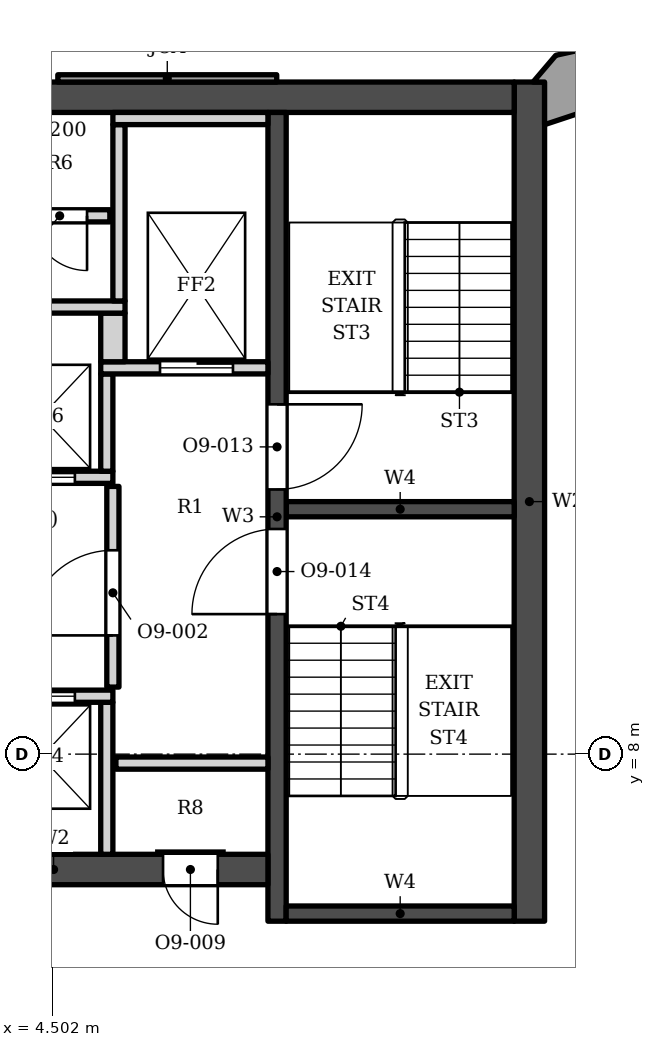
"""IFC4 building model, lengths in metres.
Left out: names, types, materials, properties, quantities, classifications, styles, units other than length and angle.
Written with IfcOpenShell. Run it as: python <this file> out.ifc"""

import sys

from ifc_helpers import new_model, si_unit, direction, frame, frame_2d, origin, place, context, subcontext, project, spatial, polyline, rectangle, outline, extrude, element, fill, save


model = new_model("IFC4")
c1 = context("Model", 3, precision=1e-05, world=origin(), true_north=direction((0.0, 1.0)))
c2 = subcontext(c1, "Body", "Model", "MODEL_VIEW")
j1 = project(units=[si_unit("LENGTHUNIT", "METRE"), si_unit("PLANEANGLEUNIT", "RADIAN")], contexts=[c1])
p1 = place(None, origin())
s1 = spatial("IfcSite", under=j1, at=p1, CompositionType="ELEMENT")
p2 = place(p1, origin())
s2 = spatial("IfcBuilding", under=s1, at=p2, CompositionType="ELEMENT")
p3 = place(p2, frame((0.0, 0.0, 248.2)))
s3 = spatial("IfcBuildingStorey", under=s2, at=p3, CompositionType="ELEMENT", Elevation=248.2)
p4 = place(p3, frame((-12.1, 18.802, 0.0), z_axis=(0.0, 0.0, 1.0), x_axis=(1.0, 0.0, 0.0)))
e1 = element("IfcWall", 1, at=p4, inside=s3, PredefinedType="SHEAR", context=c2, shape_type="SweptSolid", body=[
    extrude(rectangle(XDim=24.2, YDim=0.5, at=frame_2d((12.1, 0.0))), origin(), (0.0, 0.0, 1.0), 3.9),
])
p5 = place(p3, frame((12.35, 5.253, 0.0), z_axis=(0.0, 0.0, 1.0), x_axis=(0.0, 1.0, 0.0)))
e2 = element("IfcWall", 2, at=p5, inside=s3, PredefinedType="SHEAR", context=c2, shape_type="SweptSolid", body=[
    extrude(rectangle(XDim=13.8, YDim=0.5, at=frame_2d((6.9, 0.0))), origin(), (0.0, 0.0, 1.0), 3.9),
])
p6 = place(p3, frame((8.2, 5.253, 0.0), z_axis=(0.0, 0.0, 1.0), x_axis=(0.0, 1.0, 0.0)))
e3 = element("IfcWall", 3, at=p6, inside=s3, PredefinedType="SHEAR", context=c2, shape_type="SweptSolid", body=[
    extrude(rectangle(XDim=13.3, YDim=0.3, at=frame_2d((6.65, 0.0))), origin(), (0.0, 0.0, 1.0), 3.9),
])
p7 = place(p6, frame((7.1, 0.0, 0.0)))
e4 = element("IfcOpeningElement", 4, at=p7, cuts=e3, PredefinedType="OPENING", context=c2, shape_type="SweptSolid", body=[
    extrude(rectangle(XDim=1.4, YDim=2.1, at=frame_2d((0.7, 1.05))), frame((0.0, 0.16, 0.0), z_axis=(0.0, -1.0, 0.0), x_axis=(1.0, 0.0, 0.0)), (0.0, 0.0, 1.0), 0.32),
])
p8 = place(p6, frame((5.05, 0.0, 0.0)))
e5 = element("IfcOpeningElement", 5, at=p8, cuts=e3, PredefinedType="OPENING", context=c2, shape_type="SweptSolid", body=[
    extrude(rectangle(XDim=1.4, YDim=2.1, at=frame_2d((0.7, 1.05))), frame((0.0, 0.16, 0.0), z_axis=(0.0, -1.0, 0.0), x_axis=(1.0, 0.0, 0.0)), (0.0, 0.0, 1.0), 0.32),
])
for number, where, z_axis, x_axis in (
    (6, (8.35, 12.028, 0.0), (0.0, 0.0, 1.0), (1.0, 0.0, 0.0)),
    (7, (8.35, 5.378, 0.0), (0.0, 0.0, 1.0), (1.0, 0.0, 0.0)),
):
    element("IfcWall", number, at=place(p3, frame(where, z_axis=z_axis, x_axis=x_axis)), inside=s3, PredefinedType="SHEAR", context=c2, shape_type="SweptSolid", body=[
        extrude(rectangle(XDim=3.75, YDim=0.25, at=frame_2d((1.875, 0.0))), origin(), (0.0, 0.0, 1.0), 3.9),
    ])
p9 = place(p3, frame((1.0, 6.103, 0.0), z_axis=(0.0, 0.0, 1.0), x_axis=(1.0, 0.0, 0.0)))
e8 = element("IfcWall", 8, at=p9, inside=s3, PredefinedType="SHEAR", context=c2, shape_type="SweptSolid", body=[
    extrude(rectangle(XDim=7.05, YDim=0.5, at=frame_2d((3.525, 0.0))), origin(), (0.0, 0.0, 1.0), 3.9),
])
p10 = place(p9, frame((5.325, 0.0, 0.0)))
e9 = element("IfcOpeningElement", 9, at=p10, cuts=e8, PredefinedType="OPENING", context=c2, shape_type="SweptSolid", body=[
    extrude(rectangle(XDim=0.9, YDim=2.1, at=frame_2d((0.45, 1.05))), frame((0.0, 0.26, 0.0), z_axis=(0.0, -1.0, 0.0), x_axis=(1.0, 0.0, 0.0)), (0.0, 0.0, 1.0), 0.52),
])
p11 = place(p3, origin())
e10 = element("IfcWall", 10, at=p11, inside=s3, PredefinedType="SOLIDWALL", context=c2, shape_type="SweptSolid", body=[
    extrude(outline(polyline([(4.594, 19.173), (4.594, 19.052), (8.195, 19.052), (8.195, 19.173), (4.594, 19.173)])), origin(), (0.0, 0.0, 1.0), 3.0),
])
p12 = place(p3, origin())
e11 = element("IfcWall", 11, at=p12, inside=s3, PredefinedType="SOLIDWALL", context=c2, shape_type="SweptSolid", body=[
    extrude(outline(polyline([(14.201, 18.883), (14.008, 19.762), (12.784, 19.492), (12.41, 19.052), (12.6, 19.052), (12.6, 18.352), (14.201, 18.883)])), origin(), (0.0, 0.0, 1.0), 3.0),
])
for number, where, z_axis, x_axis in (
    (12, (5.4, 6.353, 0.0), (0.0, 0.0, 1.0), (0.0, 1.0, 0.0)),
    (13, (5.55, 7.853, 0.0), (0.0, 0.0, 1.0), (1.0, 0.0, 0.0)),
):
    element("IfcWall", number, at=place(p3, frame(where, z_axis=z_axis, x_axis=x_axis)), inside=s3, PredefinedType="SOLIDWALL", context=c2, shape_type="SweptSolid", body=[
        extrude(rectangle(XDim=2.5, YDim=0.2, at=frame_2d((1.25, 0.0))), origin(), (0.0, 0.0, 1.0), 3.73),
    ])
p13 = place(p3, frame((1.0, 8.953, 0.0), z_axis=(0.0, 0.0, 1.0), x_axis=(1.0, 0.0, 0.0)))
e14 = element("IfcWall", 14, at=p13, inside=s3, PredefinedType="SOLIDWALL", context=c2, shape_type="SweptSolid", body=[
    extrude(rectangle(XDim=4.5, YDim=0.2, at=frame_2d((2.25, 0.0))), origin(), (0.0, 0.0, 1.0), 3.73),
])
p14 = place(p13, frame((0.625, 0.0, 0.0)))
e15 = element("IfcOpeningElement", 15, at=p14, cuts=e14, PredefinedType="OPENING", context=c2, shape_type="SweptSolid", body=[
    extrude(rectangle(XDim=1.1, YDim=2.1, at=frame_2d((0.55, 1.05))), frame((0.0, 0.11, 0.0), z_axis=(0.0, -1.0, 0.0), x_axis=(1.0, 0.0, 0.0)), (0.0, 0.0, 1.0), 0.22),
])
p15 = place(p13, frame((2.775, 0.0, 0.0)))
e16 = element("IfcOpeningElement", 16, at=p15, cuts=e14, PredefinedType="OPENING", context=c2, shape_type="SweptSolid", body=[
    extrude(rectangle(XDim=1.1, YDim=2.1, at=frame_2d((0.55, 1.05))), frame((0.0, 0.11, 0.0), z_axis=(0.0, -1.0, 0.0), x_axis=(1.0, 0.0, 0.0)), (0.0, 0.0, 1.0), 0.22),
])
p16 = place(p3, frame((5.5, 9.103, 0.0), z_axis=(0.0, 0.0, 1.0), x_axis=(0.0, 1.0, 0.0)))
e17 = element("IfcWall", 17, at=p16, inside=s3, PredefinedType="SOLIDWALL", context=c2, shape_type="SweptSolid", body=[
    extrude(rectangle(XDim=3.3, YDim=0.2, at=frame_2d((1.65, 0.0))), origin(), (0.0, 0.0, 1.0), 3.73),
])
p17 = place(p16, frame((0.85, 0.0, 0.0)))
e18 = element("IfcOpeningElement", 18, at=p17, cuts=e17, PredefinedType="OPENING", context=c2, shape_type="SweptSolid", body=[
    extrude(rectangle(XDim=1.4, YDim=2.1, at=frame_2d((0.7, 1.05))), frame((0.0, 0.11, 0.0), z_axis=(0.0, -1.0, 0.0), x_axis=(1.0, 0.0, 0.0)), (0.0, 0.0, 1.0), 0.22),
])
p18 = place(p3, frame((-1.5, 12.552, 0.0), z_axis=(0.0, 0.0, 1.0), x_axis=(1.0, 0.0, 0.0)))
e19 = element("IfcWall", 19, at=p18, inside=s3, PredefinedType="SOLIDWALL", context=c2, shape_type="SweptSolid", body=[
    extrude(rectangle(XDim=7.0, YDim=0.2, at=frame_2d((3.5, 0.0))), origin(), (0.0, 0.0, 1.0), 3.73),
])
p19 = place(p18, frame((3.075, 0.0, 0.0)))
e20 = element("IfcOpeningElement", 20, at=p19, cuts=e19, PredefinedType="OPENING", context=c2, shape_type="SweptSolid", body=[
    extrude(rectangle(XDim=1.1, YDim=2.1, at=frame_2d((0.55, 1.05))), frame((0.0, 0.11, 0.0), z_axis=(0.0, -1.0, 0.0), x_axis=(1.0, 0.0, 0.0)), (0.0, 0.0, 1.0), 0.22),
])
p20 = place(p18, frame((5.275, 0.0, 0.0)))
e21 = element("IfcOpeningElement", 21, at=p20, cuts=e19, PredefinedType="OPENING", context=c2, shape_type="SweptSolid", body=[
    extrude(rectangle(XDim=1.1, YDim=2.1, at=frame_2d((0.55, 1.05))), frame((0.0, 0.11, 0.0), z_axis=(0.0, -1.0, 0.0), x_axis=(1.0, 0.0, 0.0)), (0.0, 0.0, 1.0), 0.22),
])
p21 = place(p3, frame((5.4, 12.653, 0.0), z_axis=(0.0, 0.0, 1.0), x_axis=(0.0, 1.0, 0.0)))
e22 = element("IfcWall", 22, at=p21, inside=s3, PredefinedType="SOLIDWALL", context=c2, shape_type="SweptSolid", body=[
    extrude(rectangle(XDim=1.6, YDim=0.2, at=frame_2d((0.8, 0.0))), origin(), (0.0, 0.0, 1.0), 3.73),
])
p22 = place(p3, frame((5.3, 14.353, 0.0), z_axis=(0.0, 0.0, 1.0), x_axis=(1.0, 0.0, 0.0)))
e23 = element("IfcWall", 23, at=p22, inside=s3, PredefinedType="SOLIDWALL", context=c2, shape_type="SweptSolid", body=[
    extrude(rectangle(XDim=2.75, YDim=0.2, at=frame_2d((1.375, 0.0))), origin(), (0.0, 0.0, 1.0), 3.73),
])
p23 = place(p22, frame((0.975, 0.0, 0.0)))
e24 = element("IfcOpeningElement", 24, at=p23, cuts=e23, PredefinedType="OPENING", context=c2, shape_type="SweptSolid", body=[
    extrude(rectangle(XDim=1.2, YDim=2.1, at=frame_2d((0.6, 1.05))), frame((0.0, 0.11, 0.0), z_axis=(0.0, -1.0, 0.0), x_axis=(1.0, 0.0, 0.0)), (0.0, 0.0, 1.0), 0.22),
])
p24 = place(p3, frame((5.5, 14.453, 0.0), z_axis=(0.0, 0.0, 1.0), x_axis=(0.0, 1.0, 0.0)))
e25 = element("IfcWall", 25, at=p24, inside=s3, PredefinedType="SOLIDWALL", context=c2, shape_type="SweptSolid", body=[
    extrude(rectangle(XDim=0.8, YDim=0.4, at=frame_2d((0.4, 0.0))), origin(), (0.0, 0.0, 1.0), 3.73),
])
p25 = place(p3, frame((-1.5, 15.353, 0.0), z_axis=(0.0, 0.0, 1.0), x_axis=(1.0, 0.0, 0.0)))
e26 = element("IfcWall", 26, at=p25, inside=s3, PredefinedType="SOLIDWALL", context=c2, shape_type="SweptSolid", body=[
    extrude(rectangle(XDim=7.2, YDim=0.2, at=frame_2d((3.6, 0.0))), origin(), (0.0, 0.0, 1.0), 3.73),
])
p26 = place(p3, frame((5.6, 15.453, 0.0), z_axis=(0.0, 0.0, 1.0), x_axis=(0.0, 1.0, 0.0)))
e27 = element("IfcWall", 27, at=p26, inside=s3, PredefinedType="SOLIDWALL", context=c2, shape_type="SweptSolid", body=[
    extrude(rectangle(XDim=2.9, YDim=0.2, at=frame_2d((1.45, 0.0))), origin(), (0.0, 0.0, 1.0), 3.73),
])
p27 = place(p3, frame((-1.6, 16.853, 0.0), z_axis=(0.0, 0.0, 1.0), x_axis=(1.0, 0.0, 0.0)))
e28 = element("IfcWall", 28, at=p27, inside=s3, PredefinedType="SOLIDWALL", context=c2, shape_type="SweptSolid", body=[
    extrude(rectangle(XDim=7.05, YDim=0.2, at=frame_2d((3.525, 0.0))), origin(), (0.0, 0.0, 1.0), 3.73),
])
p28 = place(p27, frame((0.525, 0.0, 0.0)))
e29 = element("IfcOpeningElement", 29, at=p28, cuts=e28, PredefinedType="OPENING", context=c2, shape_type="SweptSolid", body=[
    extrude(rectangle(XDim=0.9, YDim=2.1, at=frame_2d((0.45, 1.05))), frame((0.0, 0.11, 0.0), z_axis=(0.0, -1.0, 0.0), x_axis=(1.0, 0.0, 0.0)), (0.0, 0.0, 1.0), 0.22),
])
p29 = place(p27, frame((3.15, 0.0, 0.0)))
e30 = element("IfcOpeningElement", 30, at=p29, cuts=e28, PredefinedType="OPENING", context=c2, shape_type="SweptSolid", body=[
    extrude(rectangle(XDim=0.9, YDim=2.1, at=frame_2d((0.45, 1.05))), frame((0.0, 0.11, 0.0), z_axis=(0.0, -1.0, 0.0), x_axis=(1.0, 0.0, 0.0)), (0.0, 0.0, 1.0), 0.22),
])
p30 = place(p27, frame((5.775, 0.0, 0.0)))
e31 = element("IfcOpeningElement", 31, at=p30, cuts=e28, PredefinedType="OPENING", context=c2, shape_type="SweptSolid", body=[
    extrude(rectangle(XDim=0.9, YDim=2.1, at=frame_2d((0.45, 1.05))), frame((0.0, 0.11, 0.0), z_axis=(0.0, -1.0, 0.0), x_axis=(1.0, 0.0, 0.0)), (0.0, 0.0, 1.0), 0.22),
])
p31 = place(p3, frame((5.5, 18.453, 0.0), z_axis=(0.0, 0.0, 1.0), x_axis=(1.0, 0.0, 0.0)))
e32 = element("IfcWall", 32, at=p31, inside=s3, PredefinedType="SOLIDWALL", context=c2, shape_type="SweptSolid", body=[
    extrude(rectangle(XDim=2.55, YDim=0.2, at=frame_2d((1.275, 0.0))), origin(), (0.0, 0.0, 1.0), 3.73),
])
p32 = place(p15, origin())
e33 = element("IfcDoor", 33, at=p32, inside=s3, OperationType="DOUBLE_DOOR_SLIDING", PredefinedType="DOOR", context=c2, shape_type="SweptSolid", body=[
    extrude(rectangle(XDim=1.1, YDim=2.1, at=frame_2d((0.55, 1.05))), frame((0.0, 0.025, 0.0), z_axis=(0.0, -1.0, 0.0), x_axis=(1.0, 0.0, 0.0)), (0.0, 0.0, 1.0), 0.05),
])
fill(e16, e33)
p33 = place(p20, origin())
e34 = element("IfcDoor", 34, at=p33, inside=s3, OperationType="DOUBLE_DOOR_SLIDING", PredefinedType="DOOR", context=c2, shape_type="SweptSolid", body=[
    extrude(rectangle(XDim=1.1, YDim=2.1, at=frame_2d((0.55, 1.05))), frame((0.0, 0.025, 0.0), z_axis=(0.0, -1.0, 0.0), x_axis=(1.0, 0.0, 0.0)), (0.0, 0.0, 1.0), 0.05),
])
fill(e21, e34)
p34 = place(p23, origin())
e35 = element("IfcDoor", 35, at=p34, inside=s3, OperationType="DOUBLE_DOOR_SLIDING", PredefinedType="DOOR", context=c2, shape_type="SweptSolid", body=[
    extrude(rectangle(XDim=1.2, YDim=2.1, at=frame_2d((0.6, 1.05))), frame((0.0, 0.025, 0.0), z_axis=(0.0, -1.0, 0.0), x_axis=(1.0, 0.0, 0.0)), (0.0, 0.0, 1.0), 0.05),
])
fill(e24, e35)
p35 = place(p7, origin())
e36 = element("IfcDoor", 36, at=p35, inside=s3, OperationType="SINGLE_SWING_RIGHT", PredefinedType="DOOR", context=c2, shape_type="SweptSolid", body=[
    extrude(rectangle(XDim=1.4, YDim=2.1, at=frame_2d((0.7, 1.05))), frame((0.0, 0.025, 0.0), z_axis=(0.0, -1.0, 0.0), x_axis=(1.0, 0.0, 0.0)), (0.0, 0.0, 1.0), 0.05),
])
fill(e4, e36)
p36 = place(p8, origin())
e37 = element("IfcDoor", 37, at=p36, inside=s3, OperationType="SINGLE_SWING_LEFT", PredefinedType="DOOR", context=c2, shape_type="SweptSolid", body=[
    extrude(rectangle(XDim=1.4, YDim=2.1, at=frame_2d((0.7, 1.05))), frame((0.0, 0.025, 0.0), z_axis=(0.0, -1.0, 0.0), x_axis=(1.0, 0.0, 0.0)), (0.0, 0.0, 1.0), 0.05),
])
fill(e5, e37)
p37 = place(p17, origin())
e38 = element("IfcDoor", 38, at=p37, inside=s3, OperationType="SINGLE_SWING_LEFT", PredefinedType="DOOR", context=c2, shape_type="SweptSolid", body=[
    extrude(rectangle(XDim=1.4, YDim=2.1, at=frame_2d((0.7, 1.05))), frame((0.0, 0.025, 0.0), z_axis=(0.0, -1.0, 0.0), x_axis=(1.0, 0.0, 0.0)), (0.0, 0.0, 1.0), 0.05),
])
fill(e18, e38)
p38 = place(p30, origin())
e39 = element("IfcDoor", 39, at=p38, inside=s3, OperationType="SINGLE_SWING_RIGHT", PredefinedType="DOOR", context=c2, shape_type="SweptSolid", body=[
    extrude(rectangle(XDim=0.9, YDim=2.1, at=frame_2d((0.45, 1.05))), frame((0.0, 0.025, 0.0), z_axis=(0.0, -1.0, 0.0), x_axis=(1.0, 0.0, 0.0)), (0.0, 0.0, 1.0), 0.05),
])
fill(e31, e39)
p39 = place(p10, origin())
e40 = element("IfcDoor", 40, at=p39, inside=s3, OperationType="SINGLE_SWING_RIGHT", PredefinedType="DOOR", context=c2, shape_type="SweptSolid", body=[
    extrude(rectangle(XDim=0.9, YDim=2.1, at=frame_2d((0.45, 1.05))), frame((0.0, 0.025, 0.0), z_axis=(0.0, -1.0, 0.0), x_axis=(1.0, 0.0, 0.0)), (0.0, 0.0, 1.0), 0.05),
])
fill(e9, e40)
save(model, sys.argv[1])
